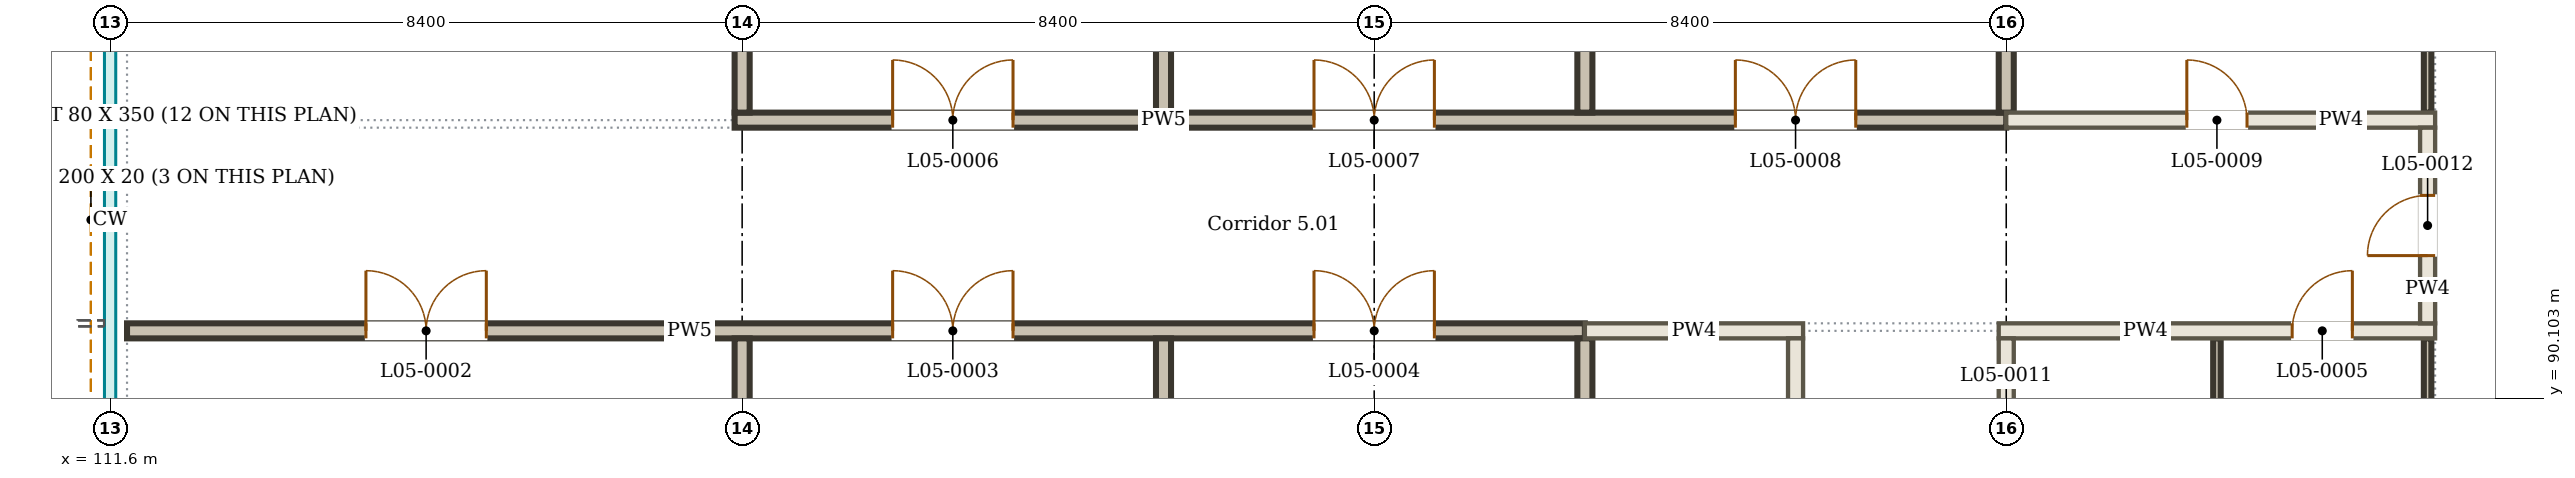
"""IFC4 building model, lengths in metres.
Left out: names, types, materials, properties, quantities, classifications, styles, units other than length and angle.
Written with IfcOpenShell. Run it as: python <this file> out.ifc"""

import sys

from ifc_helpers import new_model, si_unit, direction, frame, frame_2d, origin, place, context, subcontext, project, spatial, rectangle, extrude, element, fill, save


model = new_model("IFC4")
c1 = context("Model", 3, precision=1e-05, world=origin(), true_north=direction((0.0, 1.0)))
c2 = subcontext(c1, "Body", "Model", "MODEL_VIEW")
j1 = project(units=[si_unit("LENGTHUNIT", "METRE"), si_unit("PLANEANGLEUNIT", "RADIAN")], contexts=[c1])
p1 = place(None, origin())
s1 = spatial("IfcSite", under=j1, at=p1, CompositionType="ELEMENT")
p2 = place(p1, origin())
s2 = spatial("IfcBuilding", under=s1, at=p2, CompositionType="ELEMENT")
p3 = place(p2, frame((0.0, 0.0, 22.5)))
s3 = spatial("IfcBuildingStorey", under=s2, at=p3, CompositionType="ELEMENT", Elevation=22.5)
p4 = place(p3, frame((111.825, 91.0, 0.0), z_axis=(0.0, 0.0, 1.0), x_axis=(1.0, 0.0, 0.0)))
e1 = element("IfcWall", 1, at=p4, inside=s3, PredefinedType="SOLIDWALL", context=c2, shape_type="SweptSolid", body=[
    extrude(rectangle(XDim=19.375, YDim=0.2, at=frame_2d((9.688, 0.0))), origin(), (0.0, 0.0, 1.0), 3.844),
])
p5 = place(p4, frame((3.175, 0.0, 0.0)))
e2 = element("IfcOpeningElement", 2, at=p5, cuts=e1, PredefinedType="OPENING", context=c2, shape_type="SweptSolid", body=[
    extrude(rectangle(XDim=1.6, YDim=2.1, at=frame_2d((0.8, 1.05))), frame((0.0, 0.11, 0.0), z_axis=(0.0, -1.0, 0.0), x_axis=(1.0, 0.0, 0.0)), (0.0, 0.0, 1.0), 0.22),
])
p6 = place(p4, frame((10.175, 0.0, 0.0)))
e3 = element("IfcOpeningElement", 3, at=p6, cuts=e1, PredefinedType="OPENING", context=c2, shape_type="SweptSolid", body=[
    extrude(rectangle(XDim=1.6, YDim=2.1, at=frame_2d((0.8, 1.05))), frame((0.0, 0.11, 0.0), z_axis=(0.0, -1.0, 0.0), x_axis=(1.0, 0.0, 0.0)), (0.0, 0.0, 1.0), 0.22),
])
p7 = place(p4, frame((15.775, 0.0, 0.0)))
e4 = element("IfcOpeningElement", 4, at=p7, cuts=e1, PredefinedType="OPENING", context=c2, shape_type="SweptSolid", body=[
    extrude(rectangle(XDim=1.6, YDim=2.1, at=frame_2d((0.8, 1.05))), frame((0.0, 0.11, 0.0), z_axis=(0.0, -1.0, 0.0), x_axis=(1.0, 0.0, 0.0)), (0.0, 0.0, 1.0), 0.22),
])
p8 = place(p3, frame((131.2, 91.0, 0.0), z_axis=(0.0, 0.0, 1.0), x_axis=(1.0, 0.0, 0.0)))
e5 = element("IfcWall", 5, at=p8, inside=s3, PredefinedType="PARTITIONING", context=c2, shape_type="SweptSolid", body=[
    extrude(rectangle(XDim=2.9, YDim=0.2, at=frame_2d((1.45, 0.0))), origin(), (0.0, 0.0, 1.0), 3.936),
])
p9 = place(p3, frame((136.7, 91.0, 0.0), z_axis=(0.0, 0.0, 1.0), x_axis=(1.0, 0.0, 0.0)))
e6 = element("IfcWall", 6, at=p9, inside=s3, PredefinedType="PARTITIONING", context=c2, shape_type="SweptSolid", body=[
    extrude(rectangle(XDim=5.8, YDim=0.2, at=frame_2d((2.9, 0.0))), origin(), (0.0, 0.0, 1.0), 3.844),
])
p10 = place(p9, frame((3.9, 0.0, 0.0)))
e7 = element("IfcOpeningElement", 7, at=p10, cuts=e6, PredefinedType="OPENING", context=c2, shape_type="SweptSolid", body=[
    extrude(rectangle(XDim=0.8, YDim=2.1, at=frame_2d((0.4, 1.05))), frame((0.0, 0.11, 0.0), z_axis=(0.0, -1.0, 0.0), x_axis=(1.0, 0.0, 0.0)), (0.0, 0.0, 1.0), 0.22),
])
p11 = place(p3, frame((119.9, 93.8, 0.0), z_axis=(0.0, 0.0, 1.0), x_axis=(1.0, 0.0, 0.0)))
e8 = element("IfcWall", 8, at=p11, inside=s3, PredefinedType="SOLIDWALL", context=c2, shape_type="SweptSolid", body=[
    extrude(rectangle(XDim=16.9, YDim=0.2, at=frame_2d((8.45, 0.0))), origin(), (0.0, 0.0, 1.0), 3.844),
])
p12 = place(p11, frame((2.1, 0.0, 0.0)))
e9 = element("IfcOpeningElement", 9, at=p12, cuts=e8, PredefinedType="OPENING", context=c2, shape_type="SweptSolid", body=[
    extrude(rectangle(XDim=1.6, YDim=2.1, at=frame_2d((0.8, 1.05))), frame((0.0, 0.11, 0.0), z_axis=(0.0, -1.0, 0.0), x_axis=(1.0, 0.0, 0.0)), (0.0, 0.0, 1.0), 0.22),
])
p13 = place(p11, frame((7.7, 0.0, 0.0)))
e10 = element("IfcOpeningElement", 10, at=p13, cuts=e8, PredefinedType="OPENING", context=c2, shape_type="SweptSolid", body=[
    extrude(rectangle(XDim=1.6, YDim=2.1, at=frame_2d((0.8, 1.05))), frame((0.0, 0.11, 0.0), z_axis=(0.0, -1.0, 0.0), x_axis=(1.0, 0.0, 0.0)), (0.0, 0.0, 1.0), 0.22),
])
p14 = place(p11, frame((13.3, 0.0, 0.0)))
e11 = element("IfcOpeningElement", 11, at=p14, cuts=e8, PredefinedType="OPENING", context=c2, shape_type="SweptSolid", body=[
    extrude(rectangle(XDim=1.6, YDim=2.1, at=frame_2d((0.8, 1.05))), frame((0.0, 0.11, 0.0), z_axis=(0.0, -1.0, 0.0), x_axis=(1.0, 0.0, 0.0)), (0.0, 0.0, 1.0), 0.22),
])
p15 = place(p3, frame((136.8, 93.8, 0.0), z_axis=(0.0, 0.0, 1.0), x_axis=(1.0, 0.0, 0.0)))
e12 = element("IfcWall", 12, at=p15, inside=s3, PredefinedType="PARTITIONING", context=c2, shape_type="SweptSolid", body=[
    extrude(rectangle(XDim=5.7, YDim=0.2, at=frame_2d((2.85, 0.0))), origin(), (0.0, 0.0, 1.0), 3.844),
])
p16 = place(p15, frame((2.4, 0.0, 0.0)))
e13 = element("IfcOpeningElement", 13, at=p16, cuts=e12, PredefinedType="OPENING", context=c2, shape_type="SweptSolid", body=[
    extrude(rectangle(XDim=0.8, YDim=2.1, at=frame_2d((0.4, 1.05))), frame((0.0, 0.11, 0.0), z_axis=(0.0, -1.0, 0.0), x_axis=(1.0, 0.0, 0.0)), (0.0, 0.0, 1.0), 0.22),
])
p17 = place(p3, frame((120.0, 88.397, 0.0), z_axis=(0.0, 0.0, 1.0), x_axis=(0.0, 1.0, 0.0)))
e14 = element("IfcWall", 14, at=p17, inside=s3, PredefinedType="SOLIDWALL", context=c2, shape_type="SweptSolid", body=[
    extrude(rectangle(XDim=2.502, YDim=0.2, at=frame_2d((1.251, 0.0))), origin(), (0.0, 0.0, 1.0), 3.844),
])
p18 = place(p3, frame((120.0, 93.9, 0.0), z_axis=(0.0, 0.0, 1.0), x_axis=(0.0, 1.0, 0.0)))
e15 = element("IfcWall", 15, at=p18, inside=s3, PredefinedType="SOLIDWALL", context=c2, shape_type="SweptSolid", body=[
    extrude(rectangle(XDim=2.7, YDim=0.2, at=frame_2d((1.35, 0.0))), origin(), (0.0, 0.0, 1.0), 3.844),
])
for number, where, z_axis, x_axis in (
    (16, (125.6, 80.025, 0.0), (0.0, 0.0, 1.0), (0.0, 1.0, 0.0)),
    (17, (125.6, 93.9, 0.0), (0.0, 0.0, 1.0), (0.0, 1.0, 0.0)),
    (18, (131.2, 80.025, 0.0), (0.0, 0.0, 1.0), (0.0, 1.0, 0.0)),
    (19, (131.2, 93.9, 0.0), (0.0, 0.0, 1.0), (0.0, 1.0, 0.0)),
):
    element("IfcWall", number, at=place(p3, frame(where, z_axis=z_axis, x_axis=x_axis)), inside=s3, PredefinedType="SOLIDWALL", context=c2, shape_type="SweptSolid", body=[
        extrude(rectangle(XDim=10.875, YDim=0.2, at=frame_2d((5.438, 0.0))), origin(), (0.0, 0.0, 1.0), 3.844),
    ])
p19 = place(p3, frame((134.0, 82.3, 0.0), z_axis=(0.0, 0.0, 1.0), x_axis=(0.0, 1.0, 0.0)))
e20 = element("IfcWall", 20, at=p19, inside=s3, PredefinedType="PARTITIONING", context=c2, shape_type="SweptSolid", body=[
    extrude(rectangle(XDim=8.6, YDim=0.2, at=frame_2d((4.3, 0.0))), origin(), (0.0, 0.0, 1.0), 3.844),
])
p20 = place(p19, frame((3.9, 0.0, 0.0)))
e21 = element("IfcOpeningElement", 21, at=p20, cuts=e20, PredefinedType="OPENING", context=c2, shape_type="SweptSolid", body=[
    extrude(rectangle(XDim=0.8, YDim=2.1, at=frame_2d((0.4, 1.05))), frame((0.0, 0.11, 0.0), z_axis=(0.0, -1.0, 0.0), x_axis=(1.0, 0.0, 0.0)), (0.0, 0.0, 1.0), 0.22),
])
p21 = place(p3, frame((136.8, 88.2, 0.0), z_axis=(0.0, 0.0, 1.0), x_axis=(0.0, 1.0, 0.0)))
e22 = element("IfcWall", 22, at=p21, inside=s3, PredefinedType="PARTITIONING", context=c2, shape_type="SweptSolid", body=[
    extrude(rectangle(XDim=2.7, YDim=0.2, at=frame_2d((1.35, 0.0))), origin(), (0.0, 0.0, 1.0), 3.844),
])
p22 = place(p21, frame((1.0, 0.0, 0.0)))
e23 = element("IfcOpeningElement", 23, at=p22, cuts=e22, PredefinedType="OPENING", context=c2, shape_type="SweptSolid", body=[
    extrude(rectangle(XDim=0.8, YDim=2.1, at=frame_2d((0.4, 1.05))), frame((0.0, 0.11, 0.0), z_axis=(0.0, -1.0, 0.0), x_axis=(1.0, 0.0, 0.0)), (0.0, 0.0, 1.0), 0.22),
])
p23 = place(p3, frame((136.8, 93.9, 0.0), z_axis=(0.0, 0.0, 1.0), x_axis=(0.0, 1.0, 0.0)))
e24 = element("IfcWall", 24, at=p23, inside=s3, PredefinedType="SOLIDWALL", context=c2, shape_type="SweptSolid", body=[
    extrude(rectangle(XDim=2.503, YDim=0.2, at=frame_2d((1.251, 0.0))), origin(), (0.0, 0.0, 1.0), 3.844),
])
for number, where, z_axis, x_axis in (
    (25, (139.6, 88.2, 0.0), (0.0, 0.0, 1.0), (0.0, 1.0, 0.0)),
    (26, (142.4, 88.2, 0.0), (0.0, 0.0, 1.0), (0.0, 1.0, 0.0)),
):
    element("IfcWall", number, at=place(p3, frame(where, z_axis=z_axis, x_axis=x_axis)), inside=s3, PredefinedType="SOLIDWALL", context=c2, shape_type="SweptSolid", body=[
        extrude(rectangle(XDim=2.7, YDim=0.1, at=frame_2d((1.35, 0.0))), origin(), (0.0, 0.0, 1.0), 3.936),
    ])
p24 = place(p3, frame((142.4, 91.1, 0.0), z_axis=(0.0, 0.0, 1.0), x_axis=(0.0, 1.0, 0.0)))
e27 = element("IfcWall", 27, at=p24, inside=s3, PredefinedType="PARTITIONING", context=c2, shape_type="SweptSolid", body=[
    extrude(rectangle(XDim=2.6, YDim=0.2, at=frame_2d((1.3, 0.0))), origin(), (0.0, 0.0, 1.0), 3.936),
])
p25 = place(p24, frame((0.9, 0.0, 0.0)))
e28 = element("IfcOpeningElement", 28, at=p25, cuts=e27, PredefinedType="OPENING", context=c2, shape_type="SweptSolid", body=[
    extrude(rectangle(XDim=0.8, YDim=2.1, at=frame_2d((0.4, 1.05))), frame((0.0, 0.11, 0.0), z_axis=(0.0, -1.0, 0.0), x_axis=(1.0, 0.0, 0.0)), (0.0, 0.0, 1.0), 0.22),
])
p26 = place(p3, frame((142.4, 93.9, 0.0), z_axis=(0.0, 0.0, 1.0), x_axis=(0.0, 1.0, 0.0)))
e29 = element("IfcWall", 29, at=p26, inside=s3, PredefinedType="SOLIDWALL", context=c2, shape_type="SweptSolid", body=[
    extrude(rectangle(XDim=10.875, YDim=0.1, at=frame_2d((5.438, 0.0))), origin(), (0.0, 0.0, 1.0), 3.844),
])
p27 = place(p5, origin())
e30 = element("IfcDoor", 30, at=p27, inside=s3, OperationType="DOUBLE_DOOR_SINGLE_SWING", PredefinedType="DOOR", context=c2, shape_type="SweptSolid", body=[
    extrude(rectangle(XDim=1.6, YDim=2.1, at=frame_2d((0.8, 1.05))), frame((0.0, 0.025, 0.0), z_axis=(0.0, -1.0, 0.0), x_axis=(1.0, 0.0, 0.0)), (0.0, 0.0, 1.0), 0.05),
])
fill(e2, e30)
p28 = place(p6, origin())
e31 = element("IfcDoor", 31, at=p28, inside=s3, OperationType="DOUBLE_DOOR_SINGLE_SWING", PredefinedType="DOOR", context=c2, shape_type="SweptSolid", body=[
    extrude(rectangle(XDim=1.6, YDim=2.1, at=frame_2d((0.8, 1.05))), frame((0.0, 0.025, 0.0), z_axis=(0.0, -1.0, 0.0), x_axis=(1.0, 0.0, 0.0)), (0.0, 0.0, 1.0), 0.05),
])
fill(e3, e31)
p29 = place(p7, origin())
e32 = element("IfcDoor", 32, at=p29, inside=s3, OperationType="DOUBLE_DOOR_SINGLE_SWING", PredefinedType="DOOR", context=c2, shape_type="SweptSolid", body=[
    extrude(rectangle(XDim=1.6, YDim=2.1, at=frame_2d((0.8, 1.05))), frame((0.0, 0.025, 0.0), z_axis=(0.0, -1.0, 0.0), x_axis=(1.0, 0.0, 0.0)), (0.0, 0.0, 1.0), 0.05),
])
fill(e4, e32)
p30 = place(p10, origin())
e33 = element("IfcDoor", 33, at=p30, inside=s3, OperationType="SINGLE_SWING_RIGHT", PredefinedType="DOOR", context=c2, shape_type="SweptSolid", body=[
    extrude(rectangle(XDim=0.8, YDim=2.1, at=frame_2d((0.4, 1.05))), frame((0.0, 0.025, 0.0), z_axis=(0.0, -1.0, 0.0), x_axis=(1.0, 0.0, 0.0)), (0.0, 0.0, 1.0), 0.05),
])
fill(e7, e33)
p31 = place(p12, origin())
e34 = element("IfcDoor", 34, at=p31, inside=s3, OperationType="DOUBLE_DOOR_SINGLE_SWING", PredefinedType="DOOR", context=c2, shape_type="SweptSolid", body=[
    extrude(rectangle(XDim=1.6, YDim=2.1, at=frame_2d((0.8, 1.05))), frame((0.0, 0.025, 0.0), z_axis=(0.0, -1.0, 0.0), x_axis=(1.0, 0.0, 0.0)), (0.0, 0.0, 1.0), 0.05),
])
fill(e9, e34)
p32 = place(p13, origin())
e35 = element("IfcDoor", 35, at=p32, inside=s3, OperationType="DOUBLE_DOOR_SINGLE_SWING", PredefinedType="DOOR", context=c2, shape_type="SweptSolid", body=[
    extrude(rectangle(XDim=1.6, YDim=2.1, at=frame_2d((0.8, 1.05))), frame((0.0, 0.025, 0.0), z_axis=(0.0, -1.0, 0.0), x_axis=(1.0, 0.0, 0.0)), (0.0, 0.0, 1.0), 0.05),
])
fill(e10, e35)
p33 = place(p14, origin())
e36 = element("IfcDoor", 36, at=p33, inside=s3, OperationType="DOUBLE_DOOR_SINGLE_SWING", PredefinedType="DOOR", context=c2, shape_type="SweptSolid", body=[
    extrude(rectangle(XDim=1.6, YDim=2.1, at=frame_2d((0.8, 1.05))), frame((0.0, 0.025, 0.0), z_axis=(0.0, -1.0, 0.0), x_axis=(1.0, 0.0, 0.0)), (0.0, 0.0, 1.0), 0.05),
])
fill(e11, e36)
p34 = place(p16, origin())
e37 = element("IfcDoor", 37, at=p34, inside=s3, OperationType="SINGLE_SWING_LEFT", PredefinedType="DOOR", context=c2, shape_type="SweptSolid", body=[
    extrude(rectangle(XDim=0.8, YDim=2.1, at=frame_2d((0.4, 1.05))), frame((0.0, 0.025, 0.0), z_axis=(0.0, -1.0, 0.0), x_axis=(1.0, 0.0, 0.0)), (0.0, 0.0, 1.0), 0.05),
])
fill(e13, e37)
p35 = place(p25, origin())
e38 = element("IfcDoor", 38, at=p35, inside=s3, OperationType="SINGLE_SWING_LEFT", PredefinedType="DOOR", context=c2, shape_type="SweptSolid", body=[
    extrude(rectangle(XDim=0.8, YDim=2.1, at=frame_2d((0.4, 1.05))), frame((0.0, 0.025, 0.0), z_axis=(0.0, -1.0, 0.0), x_axis=(1.0, 0.0, 0.0)), (0.0, 0.0, 1.0), 0.05),
])
fill(e28, e38)
save(model, sys.argv[1])
